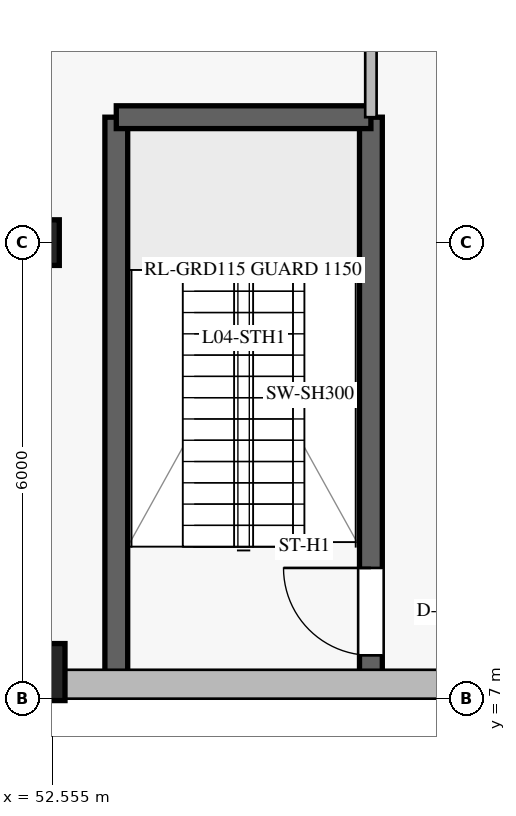
"""IFC4 building model, lengths in metres.
Left out: names, types, materials, properties, quantities, classifications, styles, units other than length and angle.
Written with IfcOpenShell. Run it as: python <this file> out.ifc"""

import sys

from ifc_helpers import new_model, si_unit, direction, frame, frame_2d, origin, origin_2d, place, context, subcontext, project, spatial, rectangle, extrude, element, fill, save


model = new_model("IFC4")
c1 = context("Model", 3, precision=1e-05, world=origin(), true_north=direction((0.0, 1.0)))
c2 = subcontext(c1, "Body", "Model", "MODEL_VIEW")
j1 = project(units=[si_unit("LENGTHUNIT", "METRE"), si_unit("PLANEANGLEUNIT", "RADIAN")], contexts=[c1])
p1 = place(None, origin())
s1 = spatial("IfcSite", under=j1, at=p1, CompositionType="ELEMENT")
p2 = place(p1, origin())
s2 = spatial("IfcBuilding", under=s1, at=p2, CompositionType="ELEMENT")
p3 = place(p2, frame((0.0, 0.0, 19.0)))
s3 = spatial("IfcBuildingStorey", under=s2, at=p3, CompositionType="ELEMENT", Elevation=19.0)
p4 = place(p3, frame((56.75, 7.35, 0.0), z_axis=(0.0, 0.0, 1.0), x_axis=(0.0, 1.0, 0.0)))
e1 = element("IfcWall", 1, at=p4, inside=s3, PredefinedType="SOLIDWALL", context=c2, shape_type="SweptSolid", body=[
    extrude(rectangle(XDim=7.3, YDim=0.3, at=frame_2d((3.65, 0.0))), origin(), (0.0, 0.0, 1.0), 4.73),
])
p5 = place(p4, frame((0.22, 0.0, 0.0)))
e2 = element("IfcOpeningElement", 2, at=p5, cuts=e1, PredefinedType="OPENING", context=c2, shape_type="SweptSolid", body=[
    extrude(rectangle(XDim=1.15, YDim=2.2, at=frame_2d((0.575, 1.1))), frame((0.0, 0.16, 0.0), z_axis=(0.0, -1.0, 0.0), x_axis=(1.0, 0.0, 0.0)), (0.0, 0.0, 1.0), 0.32),
])
p6 = place(p3, frame((53.4, 7.35, 0.0), z_axis=(0.0, 0.0, 1.0), x_axis=(0.0, 1.0, 0.0)))
e3 = element("IfcWall", 3, at=p6, inside=s3, PredefinedType="SOLIDWALL", context=c2, shape_type="SweptSolid", body=[
    extrude(rectangle(XDim=7.3, YDim=0.3, at=frame_2d((3.65, 0.0))), origin(), (0.0, 0.0, 1.0), 4.73),
])
p7 = place(p3, frame((53.4, 14.65, 0.0), z_axis=(0.0, 0.0, 1.0), x_axis=(1.0, 0.0, 0.0)))
e4 = element("IfcWall", 4, at=p7, inside=s3, PredefinedType="SOLIDWALL", context=c2, shape_type="SweptSolid", body=[
    extrude(rectangle(XDim=3.35, YDim=0.3, at=frame_2d((1.675, 0.0))), origin(), (0.0, 0.0, 1.0), 4.73),
])
p8 = place(p3, frame((52.35, 7.35, 0.0), z_axis=(0.0, 0.0, 1.0), x_axis=(1.0, 0.0, 0.0)))
e5 = element("IfcColumn", 5, at=p8, inside=s3, PredefinedType="COLUMN", context=c2, shape_type="SweptSolid", body=[
    extrude(rectangle(XDim=0.75, YDim=0.75, at=origin_2d()), origin(), (0.0, 0.0, 1.0), 4.73),
])
p9 = place(p3, frame((52.35, 13.0, 0.0), z_axis=(0.0, 0.0, 1.0), x_axis=(1.0, 0.0, 0.0)))
e6 = element("IfcColumn", 6, at=p9, inside=s3, PredefinedType="COLUMN", context=c2, shape_type="SweptSolid", body=[
    extrude(rectangle(XDim=0.6, YDim=0.6, at=origin_2d()), origin(), (0.0, 0.0, 1.0), 4.73),
])
p10 = place(p3, frame((75.0, 7.19, 0.0), z_axis=(0.0, 0.0, 1.0), x_axis=(-1.0, 0.0, 0.0)))
e7 = element("IfcWall", 7, at=p10, inside=s3, PredefinedType="STANDARD", context=c2, shape_type="SweptSolid", body=[
    extrude(rectangle(XDim=23.0, YDim=0.38, at=frame_2d((11.5, 0.0))), origin(), (0.0, 0.0, 1.0), 4.73),
])
p11 = place(p10, frame((10.3, 0.0, 0.95)))
e8 = element("IfcOpeningElement", 8, at=p11, cuts=e7, PredefinedType="OPENING", context=c2, shape_type="SweptSolid", body=[
    extrude(rectangle(XDim=2.4, YDim=1.8, at=frame_2d((1.2, 0.9))), frame((0.0, 0.2, 0.0), z_axis=(0.0, -1.0, 0.0), x_axis=(1.0, 0.0, 0.0)), (0.0, 0.0, 1.0), 0.4),
])
p12 = place(p3, frame((56.75, 14.65, 0.0), z_axis=(0.0, 0.0, 1.0), x_axis=(0.0, 1.0, 0.0)))
e9 = element("IfcWall", 9, at=p12, inside=s3, PredefinedType="PARTITIONING", context=c2, shape_type="SweptSolid", body=[
    extrude(rectangle(XDim=20.7, YDim=0.15, at=frame_2d((10.35, 0.0))), origin(), (0.0, 0.0, 1.0), 4.76),
])
p13 = place(p12, frame((9.675, 0.0, 0.0)))
e10 = element("IfcOpeningElement", 10, at=p13, cuts=e9, PredefinedType="OPENING", context=c2, shape_type="SweptSolid", body=[
    extrude(rectangle(XDim=1.35, YDim=2.2, at=frame_2d((0.675, 1.1))), frame((0.0, 0.085, 0.0), z_axis=(0.0, -1.0, 0.0), x_axis=(1.0, 0.0, 0.0)), (0.0, 0.0, 1.0), 0.17),
])
p14 = place(p5, origin())
e11 = element("IfcDoor", 11, at=p14, inside=s3, OperationType="SINGLE_SWING_RIGHT", PredefinedType="DOOR", context=c2, shape_type="SweptSolid", body=[
    extrude(rectangle(XDim=1.15, YDim=2.2, at=frame_2d((0.575, 1.1))), frame((0.0, 0.025, 0.0), z_axis=(0.0, -1.0, 0.0), x_axis=(1.0, 0.0, 0.0)), (0.0, 0.0, 1.0), 0.05),
])
fill(e2, e11)
save(model, sys.argv[1])
